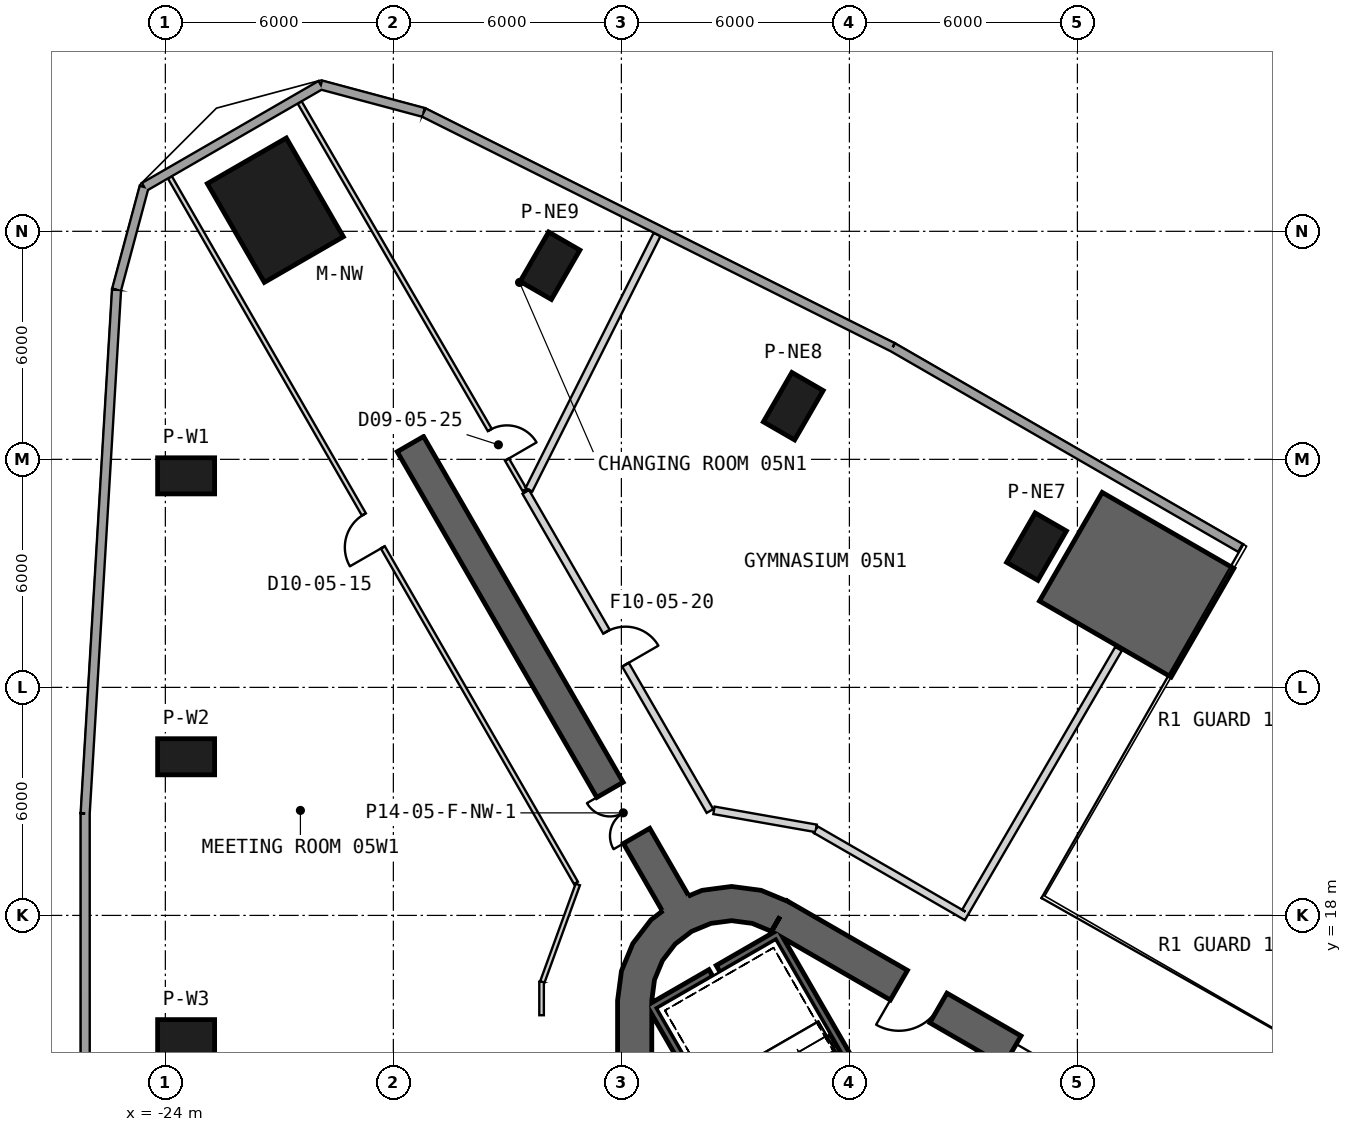
"""IFC4 building model, lengths in metres.
Left out: names, types, materials, properties, quantities, classifications, styles, units other than length and angle.
Written with IfcOpenShell. Run it as: python <this file> out.ifc"""

import sys

from ifc_helpers import new_model, si_unit, direction, frame, frame_2d, origin, origin_2d, place, context, subcontext, project, spatial, polyline, rectangle, outline, extrude, element, fill, save


model = new_model("IFC4")
c1 = context("Model", 3, precision=1e-05, world=origin(), true_north=direction((0.0, 1.0)))
c2 = subcontext(c1, "Body", "Model", "MODEL_VIEW")
j1 = project(units=[si_unit("LENGTHUNIT", "METRE"), si_unit("PLANEANGLEUNIT", "RADIAN")], contexts=[c1])
p1 = place(None, origin())
s1 = spatial("IfcSite", under=j1, at=p1, CompositionType="ELEMENT")
p2 = place(p1, origin())
s2 = spatial("IfcBuilding", under=s1, at=p2, CompositionType="ELEMENT")
p3 = place(p2, frame((0.0, 0.0, 33.5)))
s3 = spatial("IfcBuildingStorey", under=s2, at=p3, CompositionType="ELEMENT", Elevation=33.5)
p4 = place(p3, frame((-21.106, 36.556, 0.0), z_axis=(0.0, 0.0, 1.0), x_axis=(-0.5, 0.866025403784, 0.0)))
e1 = element("IfcColumn", 1, at=p4, inside=s3, PredefinedType="COLUMN", context=c2, shape_type="SweptSolid", body=[
    extrude(rectangle(XDim=3.0, YDim=2.4, at=origin_2d()), origin(), (0.0, 0.0, 1.0), 6.0),
])
for number, where, z_axis, x_axis in (
    (2, (-23.453, 29.566, 0.0), (0.0, 0.0, 1.0), (-1.0, 0.0, 0.0)),
    (3, (-23.453, 22.174, 0.0), (0.0, 0.0, 1.0), (-1.0, 0.0, 0.0)),
    (4, (-23.453, 14.783, 0.0), (0.0, 0.0, 1.0), (-1.0, 0.0, 0.0)),
    (5, (-1.076, 27.703, 0.0), (0.0, 0.0, 1.0), (0.5, 0.866, 0.0)),
    (6, (-7.477, 31.398, 0.0), (0.0, 0.0, 1.0), (0.5, 0.866, 0.0)),
    (7, (-13.878, 35.094, 0.0), (0.0, 0.0, 1.0), (0.5, 0.866, 0.0)),
):
    element("IfcColumn", number, at=place(p3, frame(where, z_axis=z_axis, x_axis=x_axis)), inside=s3, PredefinedType="COLUMN", context=c2, shape_type="SweptSolid", body=[
        extrude(rectangle(XDim=1.5, YDim=0.95, at=origin_2d()), origin(), (0.0, 0.0, 1.0), 6.0),
    ])
p5 = place(p3, frame((19.475, 2.208, 0.0), z_axis=(0.0, 0.0, 1.0), x_axis=(-0.866028369851, 0.499994862586, 0.0)))
e8 = element("IfcWall", 8, at=p5, inside=s3, PredefinedType="SHEAR", context=c2, shape_type="SweptSolid", body=[
    extrude(rectangle(XDim=31.523, YDim=0.9, at=frame_2d((15.762, 0.0))), origin(), (0.0, 0.0, 1.0), 6.0),
])
p6 = place(p5, frame((7.062, 0.0, 0.0)))
e9 = element("IfcOpeningElement", 9, at=p6, cuts=e8, PredefinedType="OPENING", context=c2, shape_type="SweptSolid", body=[
    extrude(rectangle(XDim=1.2, YDim=2.4, at=frame_2d((0.6, 1.2))), frame((0.0, 0.46, 0.0), z_axis=(0.0, -1.0, 0.0), x_axis=(1.0, 0.0, 0.0)), (0.0, 0.0, 1.0), 0.92),
])
p7 = place(p5, frame((9.762, 0.0, 0.0)))
e10 = element("IfcOpeningElement", 10, at=p7, cuts=e8, PredefinedType="OPENING", context=c2, shape_type="SweptSolid", body=[
    extrude(rectangle(XDim=1.2, YDim=2.4, at=frame_2d((0.6, 1.2))), frame((0.0, 0.46, 0.0), z_axis=(0.0, -1.0, 0.0), x_axis=(1.0, 0.0, 0.0)), (0.0, 0.0, 1.0), 0.92),
])
p8 = place(p5, frame((12.462, 0.0, 0.0)))
e11 = element("IfcOpeningElement", 11, at=p8, cuts=e8, PredefinedType="OPENING", context=c2, shape_type="SweptSolid", body=[
    extrude(rectangle(XDim=1.2, YDim=2.4, at=frame_2d((0.6, 1.2))), frame((0.0, 0.46, 0.0), z_axis=(0.0, -1.0, 0.0), x_axis=(1.0, 0.0, 0.0)), (0.0, 0.0, 1.0), 0.92),
])
p9 = place(p5, frame((15.162, 0.0, 0.0)))
e12 = element("IfcOpeningElement", 12, at=p9, cuts=e8, PredefinedType="OPENING", context=c2, shape_type="SweptSolid", body=[
    extrude(rectangle(XDim=1.2, YDim=2.4, at=frame_2d((0.6, 1.2))), frame((0.0, 0.46, 0.0), z_axis=(0.0, -1.0, 0.0), x_axis=(1.0, 0.0, 0.0)), (0.0, 0.0, 1.0), 0.92),
])
p10 = place(p5, frame((17.862, 0.0, 0.0)))
e13 = element("IfcOpeningElement", 13, at=p10, cuts=e8, PredefinedType="OPENING", context=c2, shape_type="SweptSolid", body=[
    extrude(rectangle(XDim=1.2, YDim=2.4, at=frame_2d((0.6, 1.2))), frame((0.0, 0.46, 0.0), z_axis=(0.0, -1.0, 0.0), x_axis=(1.0, 0.0, 0.0)), (0.0, 0.0, 1.0), 0.92),
])
p11 = place(p5, frame((20.562, 0.0, 0.0)))
e14 = element("IfcOpeningElement", 14, at=p11, cuts=e8, PredefinedType="OPENING", context=c2, shape_type="SweptSolid", body=[
    extrude(rectangle(XDim=1.2, YDim=2.4, at=frame_2d((0.6, 1.2))), frame((0.0, 0.46, 0.0), z_axis=(0.0, -1.0, 0.0), x_axis=(1.0, 0.0, 0.0)), (0.0, 0.0, 1.0), 0.92),
])
p12 = place(p5, frame((23.262, 0.0, 0.0)))
e15 = element("IfcOpeningElement", 15, at=p12, cuts=e8, PredefinedType="OPENING", context=c2, shape_type="SweptSolid", body=[
    extrude(rectangle(XDim=1.2, YDim=2.4, at=frame_2d((0.6, 1.2))), frame((0.0, 0.46, 0.0), z_axis=(0.0, -1.0, 0.0), x_axis=(1.0, 0.0, 0.0)), (0.0, 0.0, 1.0), 0.92),
])
p13 = place(p5, frame((3.612, 0.0, 0.0)))
e16 = element("IfcOpeningElement", 16, at=p13, cuts=e8, PredefinedType="OPENING", context=c2, shape_type="SweptSolid", body=[
    extrude(rectangle(XDim=1.2, YDim=2.4, at=frame_2d((0.6, 1.2))), frame((0.0, 0.46, 0.0), z_axis=(0.0, -1.0, 0.0), x_axis=(1.0, 0.0, 0.0)), (0.0, 0.0, 1.0), 0.92),
])
p14 = place(p5, frame((26.712, 0.0, 0.0)))
e17 = element("IfcOpeningElement", 17, at=p14, cuts=e8, PredefinedType="OPENING", context=c2, shape_type="SweptSolid", body=[
    extrude(rectangle(XDim=1.2, YDim=2.4, at=frame_2d((0.6, 1.2))), frame((0.0, 0.46, 0.0), z_axis=(0.0, -1.0, 0.0), x_axis=(1.0, 0.0, 0.0)), (0.0, 0.0, 1.0), 0.92),
])
p15 = place(p3, frame((-11.65, 15.762, 0.0), z_axis=(0.0, 0.0, 1.0), x_axis=(0.0, -1.0, 0.0)))
e18 = element("IfcWall", 18, at=p15, inside=s3, PredefinedType="SHEAR", context=c2, shape_type="SweptSolid", body=[
    extrude(rectangle(XDim=31.523, YDim=0.9, at=frame_2d((15.762, 0.0))), origin(), (0.0, 0.0, 1.0), 6.0),
])
p16 = place(p15, frame((7.062, 0.0, 0.0)))
e19 = element("IfcOpeningElement", 19, at=p16, cuts=e18, PredefinedType="OPENING", context=c2, shape_type="SweptSolid", body=[
    extrude(rectangle(XDim=1.2, YDim=2.4, at=frame_2d((0.6, 1.2))), frame((0.0, 0.46, 0.0), z_axis=(0.0, -1.0, 0.0), x_axis=(1.0, 0.0, 0.0)), (0.0, 0.0, 1.0), 0.92),
])
p17 = place(p15, frame((9.762, 0.0, 0.0)))
e20 = element("IfcOpeningElement", 20, at=p17, cuts=e18, PredefinedType="OPENING", context=c2, shape_type="SweptSolid", body=[
    extrude(rectangle(XDim=1.2, YDim=2.4, at=frame_2d((0.6, 1.2))), frame((0.0, 0.46, 0.0), z_axis=(0.0, -1.0, 0.0), x_axis=(1.0, 0.0, 0.0)), (0.0, 0.0, 1.0), 0.92),
])
p18 = place(p15, frame((12.462, 0.0, 0.0)))
e21 = element("IfcOpeningElement", 21, at=p18, cuts=e18, PredefinedType="OPENING", context=c2, shape_type="SweptSolid", body=[
    extrude(rectangle(XDim=1.2, YDim=2.4, at=frame_2d((0.6, 1.2))), frame((0.0, 0.46, 0.0), z_axis=(0.0, -1.0, 0.0), x_axis=(1.0, 0.0, 0.0)), (0.0, 0.0, 1.0), 0.92),
])
p19 = place(p15, frame((15.162, 0.0, 0.0)))
e22 = element("IfcOpeningElement", 22, at=p19, cuts=e18, PredefinedType="OPENING", context=c2, shape_type="SweptSolid", body=[
    extrude(rectangle(XDim=1.2, YDim=2.4, at=frame_2d((0.6, 1.2))), frame((0.0, 0.46, 0.0), z_axis=(0.0, -1.0, 0.0), x_axis=(1.0, 0.0, 0.0)), (0.0, 0.0, 1.0), 0.92),
])
p20 = place(p15, frame((17.862, 0.0, 0.0)))
e23 = element("IfcOpeningElement", 23, at=p20, cuts=e18, PredefinedType="OPENING", context=c2, shape_type="SweptSolid", body=[
    extrude(rectangle(XDim=1.2, YDim=2.4, at=frame_2d((0.6, 1.2))), frame((0.0, 0.46, 0.0), z_axis=(0.0, -1.0, 0.0), x_axis=(1.0, 0.0, 0.0)), (0.0, 0.0, 1.0), 0.92),
])
p21 = place(p15, frame((20.562, 0.0, 0.0)))
e24 = element("IfcOpeningElement", 24, at=p21, cuts=e18, PredefinedType="OPENING", context=c2, shape_type="SweptSolid", body=[
    extrude(rectangle(XDim=1.2, YDim=2.4, at=frame_2d((0.6, 1.2))), frame((0.0, 0.46, 0.0), z_axis=(0.0, -1.0, 0.0), x_axis=(1.0, 0.0, 0.0)), (0.0, 0.0, 1.0), 0.92),
])
p22 = place(p15, frame((23.262, 0.0, 0.0)))
e25 = element("IfcOpeningElement", 25, at=p22, cuts=e18, PredefinedType="OPENING", context=c2, shape_type="SweptSolid", body=[
    extrude(rectangle(XDim=1.2, YDim=2.4, at=frame_2d((0.6, 1.2))), frame((0.0, 0.46, 0.0), z_axis=(0.0, -1.0, 0.0), x_axis=(1.0, 0.0, 0.0)), (0.0, 0.0, 1.0), 0.92),
])
p23 = place(p15, frame((3.612, 0.0, 0.0)))
e26 = element("IfcOpeningElement", 26, at=p23, cuts=e18, PredefinedType="OPENING", context=c2, shape_type="SweptSolid", body=[
    extrude(rectangle(XDim=1.2, YDim=2.4, at=frame_2d((0.6, 1.2))), frame((0.0, 0.46, 0.0), z_axis=(0.0, -1.0, 0.0), x_axis=(1.0, 0.0, 0.0)), (0.0, 0.0, 1.0), 0.92),
])
p24 = place(p15, frame((26.712, 0.0, 0.0)))
e27 = element("IfcOpeningElement", 27, at=p24, cuts=e18, PredefinedType="OPENING", context=c2, shape_type="SweptSolid", body=[
    extrude(rectangle(XDim=1.2, YDim=2.4, at=frame_2d((0.6, 1.2))), frame((0.0, 0.46, 0.0), z_axis=(0.0, -1.0, 0.0), x_axis=(1.0, 0.0, 0.0)), (0.0, 0.0, 1.0), 0.92),
])
p25 = place(p3, origin())
e28 = element("IfcWall", 28, at=p25, inside=s3, PredefinedType="SHEAR", context=c2, shape_type="SweptSolid", body=[
    extrude(outline(polyline([(-7.6, 18.36), (-8.323, 18.659), (-9.1, 18.762), (-9.876, 18.659), (-10.6, 18.36), (-11.221, 17.883), (-11.698, 17.262), (-11.998, 16.538), (-12.1, 15.762), (-11.2, 15.762), (-11.128, 16.305), (-10.919, 16.812), (-10.585, 17.247), (-10.15, 17.58), (-9.644, 17.79), (-9.1, 17.862), (-8.556, 17.79), (-8.05, 17.58), (-7.6, 18.36)])), origin(), (0.0, 0.0, 1.0), 6.0),
])
p26 = place(p3, frame((-10.575, 18.316, 0.0), z_axis=(0.0, 0.0, 1.0), x_axis=(-0.499996575515, 0.866027380903, 0.0)))
e29 = element("IfcWall", 29, at=p26, inside=s3, PredefinedType="SHEAR", context=c2, shape_type="SweptSolid", body=[
    extrude(rectangle(XDim=13.954, YDim=0.8, at=frame_2d((6.977, 0.0))), origin(), (0.0, 0.0, 1.0), 6.0),
])
p27 = place(p26, frame((2.05, 0.0, 0.0)))
e30 = element("IfcOpeningElement", 30, at=p27, cuts=e29, PredefinedType="OPENING", context=c2, shape_type="SweptSolid", body=[
    extrude(rectangle(XDim=1.4, YDim=2.4, at=frame_2d((0.7, 1.2))), frame((0.0, 0.41, 0.0), z_axis=(0.0, -1.0, 0.0), x_axis=(1.0, 0.0, 0.0)), (0.0, 0.0, 1.0), 0.82),
])
p28 = place(p3, origin())
e31 = element("IfcWall", 31, at=p28, inside=s3, PredefinedType="SHEAR", context=c2, shape_type="SweptSolid", body=[
    extrude(outline(polyline([(4.116, 27.13), (0.652, 29.13), (-0.998, 26.272), (2.467, 24.272), (4.116, 27.13)])), origin(), (0.0, 0.0, 1.0), 6.0),
])
p29 = place(p3, frame((4.29, 27.67, 0.0), z_axis=(0.0, 0.0, 1.0), x_axis=(-0.866062075984, 0.499936476508, 0.0)))
e32 = element("IfcWall", 32, at=p29, inside=s3, PredefinedType="SOLIDWALL", context=c2, shape_type="SweptSolid", body=[
    extrude(rectangle(XDim=10.566, YDim=0.24, at=frame_2d((5.283, 0.0))), origin(), (0.0, 0.0, 1.0), 5.65),
])
p30 = place(p3, frame((-4.861, 32.952, 0.0), z_axis=(0.0, 0.0, 1.0), x_axis=(-0.894285628533, 0.447496608478, 0.0)))
e33 = element("IfcWall", 33, at=p30, inside=s3, PredefinedType="SOLIDWALL", context=c2, shape_type="SweptSolid", body=[
    extrude(rectangle(XDim=13.801, YDim=0.24, at=frame_2d((6.901, 0.0))), origin(), (0.0, 0.0, 1.0), 5.65),
])
p31 = place(p3, frame((-17.203, 39.128, 0.0), z_axis=(0.0, 0.0, 1.0), x_axis=(-0.965923146675, 0.25882904535, 0.0)))
e34 = element("IfcWall", 34, at=p31, inside=s3, PredefinedType="SOLIDWALL", context=c2, shape_type="SweptSolid", body=[
    extrude(rectangle(XDim=2.801, YDim=0.24, at=frame_2d((1.4, 0.0))), origin(), (0.0, 0.0, 1.0), 5.65),
])
p32 = place(p3, frame((-19.908, 39.853, 0.0), z_axis=(0.0, 0.0, 1.0), x_axis=(-0.866010734295, -0.500025407441, 0.0)))
e35 = element("IfcWall", 35, at=p32, inside=s3, PredefinedType="SOLIDWALL", context=c2, shape_type="SweptSolid", body=[
    extrude(rectangle(XDim=5.371, YDim=0.24, at=frame_2d((2.686, 0.0))), origin(), (0.0, 0.0, 1.0), 5.65),
])
p33 = place(p3, frame((-24.56, 37.167, 0.0), z_axis=(0.0, 0.0, 1.0), x_axis=(-0.258850842196, -0.965917305723, 0.0)))
e36 = element("IfcWall", 36, at=p33, inside=s3, PredefinedType="SOLIDWALL", context=c2, shape_type="SweptSolid", body=[
    extrude(rectangle(XDim=2.8, YDim=0.24, at=frame_2d((1.4, 0.0))), origin(), (0.0, 0.0, 1.0), 5.65),
])
p34 = place(p3, frame((-25.284, 34.462, 0.0), z_axis=(0.0, 0.0, 1.0), x_axis=(-0.059807686217, -0.998209918138, 0.0)))
e37 = element("IfcWall", 37, at=p34, inside=s3, PredefinedType="SOLIDWALL", context=c2, shape_type="SweptSolid", body=[
    extrude(rectangle(XDim=13.802, YDim=0.24, at=frame_2d((6.901, 0.0))), origin(), (0.0, 0.0, 1.0), 5.65),
])
p35 = place(p3, frame((-26.11, 20.685, 0.0), z_axis=(0.0, 0.0, 1.0), x_axis=(6.9319284e-05, -0.999999997597, 0.0)))
e38 = element("IfcWall", 38, at=p35, inside=s3, PredefinedType="SOLIDWALL", context=c2, shape_type="SweptSolid", body=[
    extrude(rectangle(XDim=10.566, YDim=0.24, at=frame_2d((5.283, 0.0))), origin(), (0.0, 0.0, 1.0), 5.65),
])
p36 = place(p3, frame((-4.158, 11.696, 0.0), z_axis=(0.0, 0.0, 1.0), x_axis=(0.508018930956, 0.861345903683, 0.0)))
e39 = element("IfcWall", 39, at=p36, inside=s3, PredefinedType="PLUMBINGWALL", context=c2, shape_type="SweptSolid", body=[
    extrude(rectangle(XDim=3.15, YDim=0.2, at=frame_2d((1.575, 0.0))), origin(), (0.0, 0.0, 1.0), 5.65),
])
p37 = place(p3, frame((-11.245, 15.678, -0.3), z_axis=(0.0, 0.0, 1.0), x_axis=(0.499977274689, -0.866038523851, 0.0)))
e40 = element("IfcWall", 40, at=p37, inside=s3, PredefinedType="SHEAR", context=c2, shape_type="SweptSolid", body=[
    extrude(rectangle(XDim=8.1, YDim=0.2, at=frame_2d((4.05, 0.0))), origin(), (0.0, 0.0, 1.0), 5.95),
])
p38 = place(p3, frame((-7.818, 17.541, -0.3), z_axis=(0.0, 0.0, 1.0), x_axis=(-0.866088799389, -0.499890179513, 0.0)))
e41 = element("IfcWall", 41, at=p38, inside=s3, PredefinedType="SHEAR", context=c2, shape_type="SweptSolid", body=[
    extrude(rectangle(XDim=1.89, YDim=0.2, at=frame_2d((0.945, 0.0))), origin(), (0.0, 0.0, 1.0), 5.95),
])
p39 = place(p3, frame((-9.645, 16.486, -0.3), z_axis=(0.0, 0.0, 1.0), x_axis=(-0.866038843867, -0.499976720371, 0.0)))
e42 = element("IfcWall", 42, at=p39, inside=s3, PredefinedType="SHEAR", context=c2, shape_type="SweptSolid", body=[
    extrude(rectangle(XDim=1.69, YDim=0.2, at=frame_2d((0.845, 0.0))), origin(), (0.0, 0.0, 1.0), 5.95),
])
p40 = place(p3, frame((-7.854, 17.405, -0.3), z_axis=(0.0, 0.0, 1.0), x_axis=(0.499997992926, -0.866026562566, 0.0)))
e43 = element("IfcWall", 43, at=p40, inside=s3, PredefinedType="SHEAR", context=c2, shape_type="SweptSolid", body=[
    extrude(rectangle(XDim=7.9, YDim=0.2, at=frame_2d((3.95, 0.0))), origin(), (0.0, 0.0, 1.0), 5.95),
])
p41 = place(p3, frame((-14.1, 16.254, 0.0), z_axis=(0.0, 0.0, 1.0), x_axis=(0.0, -1.0, 0.0)))
e44 = element("IfcWall", 44, at=p41, inside=s3, PredefinedType="PARTITIONING", context=c2, shape_type="SweptSolid", body=[
    extrude(rectangle(XDim=0.88, YDim=0.12, at=frame_2d((0.44, 0.0))), origin(), (0.0, 0.0, 1.0), 5.65),
])
p42 = place(p3, frame((-13.147, 18.814, 0.0), z_axis=(0.0, 0.0, 1.0), x_axis=(-0.34182927991, -0.939762067438, 0.0)))
e45 = element("IfcWall", 45, at=p42, inside=s3, PredefinedType="PARTITIONING", context=c2, shape_type="SweptSolid", body=[
    extrude(rectangle(XDim=2.728, YDim=0.12, at=frame_2d((1.364, 0.0))), origin(), (0.0, 0.0, 1.0), 4.73),
])
p43 = place(p3, frame((-13.196, 18.856, 0.0), z_axis=(0.0, 0.0, 1.0), x_axis=(-0.498843042698, 0.866692343771, 0.0)))
e46 = element("IfcWall", 46, at=p43, inside=s3, PredefinedType="PARTITIONING", context=c2, shape_type="SweptSolid", body=[
    extrude(rectangle(XDim=21.42, YDim=0.12, at=frame_2d((10.71, 0.0))), origin(), (0.0, 0.0, 1.0), 5.65),
])
p44 = place(p43, frame((10.186, 0.0, 0.0)))
e47 = element("IfcOpeningElement", 47, at=p44, cuts=e46, PredefinedType="OPENING", context=c2, shape_type="SweptSolid", body=[
    extrude(rectangle(XDim=1.0, YDim=2.1, at=frame_2d((0.5, 1.05))), frame((0.0, 0.07, 0.0), z_axis=(0.0, -1.0, 0.0), x_axis=(1.0, 0.0, 0.0)), (0.0, 0.0, 1.0), 0.14),
])
p45 = place(p3, frame((-14.516, 29.143, 0.0), z_axis=(0.0, 0.0, 1.0), x_axis=(0.500017455734, -0.866015325477, 0.0)))
e48 = element("IfcWall", 48, at=p45, inside=s3, PredefinedType="PARTITIONING", context=c2, shape_type="SweptSolid", body=[
    extrude(rectangle(XDim=9.695, YDim=0.2, at=frame_2d((4.848, 0.0))), origin(), (0.0, 0.0, 1.0), 5.65),
])
p46 = place(p45, frame((4.249, 0.0, 0.0)))
e49 = element("IfcOpeningElement", 49, at=p46, cuts=e48, PredefinedType="OPENING", context=c2, shape_type="SweptSolid", body=[
    extrude(rectangle(XDim=1.0, YDim=2.1, at=frame_2d((0.5, 1.05))), frame((0.0, 0.11, 0.0), z_axis=(0.0, -1.0, 0.0), x_axis=(1.0, 0.0, 0.0)), (0.0, 0.0, 1.0), 0.22),
])
p47 = place(p3, frame((-6.876, 20.291, 0.0), z_axis=(0.0, 0.0, 1.0), x_axis=(-0.984795263605, 0.173718993725, 0.0)))
e50 = element("IfcWall", 50, at=p47, inside=s3, PredefinedType="PARTITIONING", context=c2, shape_type="SweptSolid", body=[
    extrude(rectangle(XDim=2.729, YDim=0.2, at=frame_2d((1.365, 0.0))), origin(), (0.0, 0.0, 1.0), 4.73),
])
p48 = place(p3, frame((-2.91, 17.962, 0.0), z_axis=(0.0, 0.0, 1.0), x_axis=(-0.866026229868, 0.499998569178, 0.0)))
e51 = element("IfcWall", 51, at=p48, inside=s3, PredefinedType="PARTITIONING", context=c2, shape_type="SweptSolid", body=[
    extrude(rectangle(XDim=4.592, YDim=0.2, at=frame_2d((2.296, 0.0))), origin(), (0.0, 0.0, 1.0), 4.83),
])
p49 = place(p3, frame((-2.947, 18.098, 0.0), z_axis=(0.0, 0.0, 1.0), x_axis=(0.503358836551, 0.864077474343, 0.0)))
e52 = element("IfcWall", 52, at=p49, inside=s3, PredefinedType="PARTITIONING", context=c2, shape_type="SweptSolid", body=[
    extrude(rectangle(XDim=8.003, YDim=0.2, at=frame_2d((4.002, 0.0))), origin(), (0.0, 0.0, 1.0), 4.83),
])
p50 = place(p3, frame((-20.466, 39.392, 0.0), z_axis=(0.0, 0.0, 1.0), x_axis=(0.502070077019, -0.864826940932, 0.0)))
e53 = element("IfcWall", 53, at=p50, inside=s3, PredefinedType="PARTITIONING", context=c2, shape_type="SweptSolid", body=[
    extrude(rectangle(XDim=11.791, YDim=0.12, at=frame_2d((5.895, 0.0))), origin(), (0.0, 0.0, 1.0), 5.65),
])
p51 = place(p50, frame((9.967, 0.0, 0.0)))
e54 = element("IfcOpeningElement", 54, at=p51, cuts=e53, PredefinedType="OPENING", context=c2, shape_type="SweptSolid", body=[
    extrude(rectangle(XDim=0.9, YDim=2.1, at=frame_2d((0.45, 1.05))), frame((0.0, 0.07, 0.0), z_axis=(0.0, -1.0, 0.0), x_axis=(1.0, 0.0, 0.0)), (0.0, 0.0, 1.0), 0.14),
])
p52 = place(p3, frame((-11.061, 35.915, 0.0), z_axis=(0.0, 0.0, 1.0), x_axis=(-0.448733308416, -0.893665719337, 0.0)))
e55 = element("IfcWall", 55, at=p52, inside=s3, PredefinedType="PARTITIONING", context=c2, shape_type="SweptSolid", body=[
    extrude(rectangle(XDim=7.515, YDim=0.2, at=frame_2d((3.758, 0.0))), origin(), (0.0, 0.0, 1.0), 4.73),
])
p53 = place(p44, origin())
e56 = element("IfcDoor", 56, at=p53, inside=s3, OperationType="SINGLE_SWING_LEFT", PredefinedType="NOTDEFINED", context=c2, shape_type="SweptSolid", body=[
    extrude(rectangle(XDim=1.0, YDim=2.1, at=frame_2d((0.5, 1.05))), frame((0.0, 0.025, 0.0), z_axis=(0.0, -1.0, 0.0), x_axis=(1.0, 0.0, 0.0)), (0.0, 0.0, 1.0), 0.05),
])
fill(e47, e56)
p54 = place(p46, origin())
e57 = element("IfcDoor", 57, at=p54, inside=s3, OperationType="SINGLE_SWING_RIGHT", PredefinedType="USERDEFINED", context=c2, shape_type="SweptSolid", body=[
    extrude(rectangle(XDim=1.0, YDim=2.1, at=frame_2d((0.5, 1.05))), frame((0.0, 0.025, 0.0), z_axis=(0.0, -1.0, 0.0), x_axis=(1.0, 0.0, 0.0)), (0.0, 0.0, 1.0), 0.05),
])
fill(e49, e57)
p55 = place(p51, origin())
e58 = element("IfcDoor", 58, at=p55, inside=s3, OperationType="SINGLE_SWING_RIGHT", PredefinedType="NOTDEFINED", context=c2, shape_type="SweptSolid", body=[
    extrude(rectangle(XDim=0.9, YDim=2.1, at=frame_2d((0.45, 1.05))), frame((0.0, 0.025, 0.0), z_axis=(0.0, -1.0, 0.0), x_axis=(1.0, 0.0, 0.0)), (0.0, 0.0, 1.0), 0.05),
])
fill(e54, e58)
p56 = place(p12, origin())
e59 = element("IfcDoor", 59, at=p56, inside=s3, OperationType="SLIDING_TO_LEFT", PredefinedType="USERDEFINED", context=c2, shape_type="SweptSolid", body=[
    extrude(rectangle(XDim=1.2, YDim=2.4, at=frame_2d((0.6, 1.2))), frame((0.0, 0.025, 0.0), z_axis=(0.0, -1.0, 0.0), x_axis=(1.0, 0.0, 0.0)), (0.0, 0.0, 1.0), 0.05),
])
fill(e15, e59)
p57 = place(p14, origin())
e60 = element("IfcDoor", 60, at=p57, inside=s3, OperationType="SINGLE_SWING_RIGHT", PredefinedType="USERDEFINED", context=c2, shape_type="SweptSolid", body=[
    extrude(rectangle(XDim=1.2, YDim=2.4, at=frame_2d((0.6, 1.2))), frame((0.0, 0.025, 0.0), z_axis=(0.0, -1.0, 0.0), x_axis=(1.0, 0.0, 0.0)), (0.0, 0.0, 1.0), 0.05),
])
fill(e17, e60)
p58 = place(p27, origin())
e61 = element("IfcDoor", 61, at=p58, inside=s3, OperationType="DOUBLE_DOOR_SINGLE_SWING", PredefinedType="NOTDEFINED", context=c2, shape_type="SweptSolid", body=[
    extrude(rectangle(XDim=1.4, YDim=2.4, at=frame_2d((0.7, 1.2))), frame((0.0, 0.025, 0.0), z_axis=(0.0, -1.0, 0.0), x_axis=(1.0, 0.0, 0.0)), (0.0, 0.0, 1.0), 0.05),
])
fill(e30, e61)
save(model, sys.argv[1])
